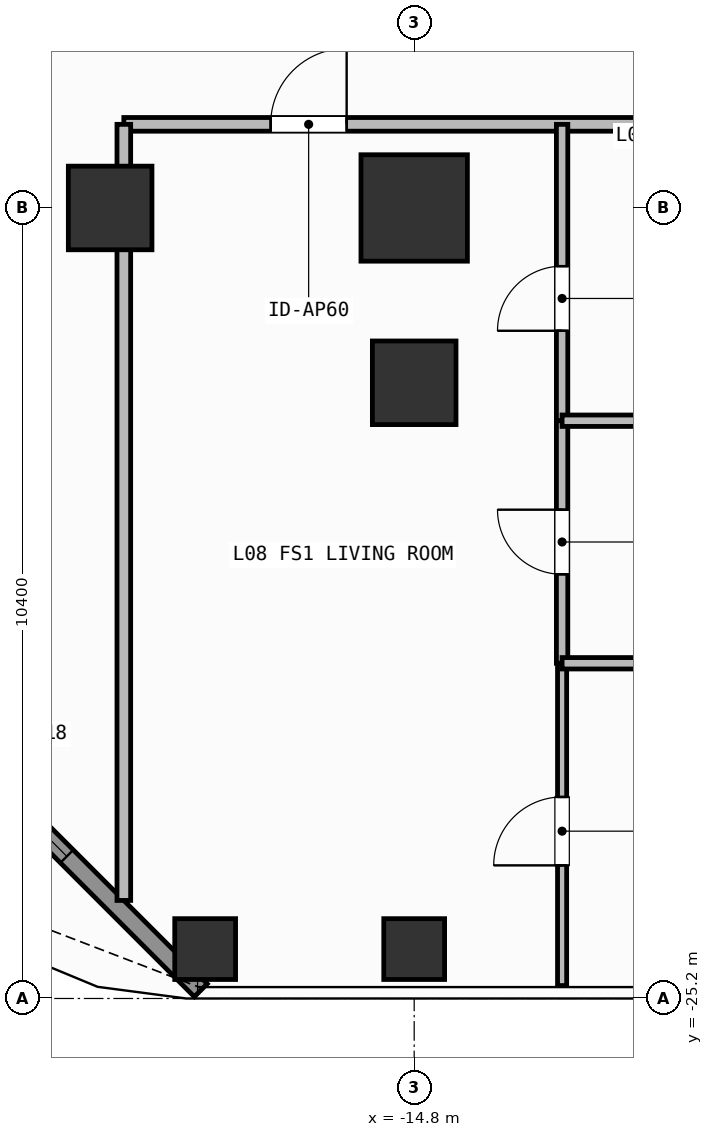
"""IFC4 building model, lengths in metres.
Left out: names, types, materials, properties, quantities, classifications, styles, units other than length and angle.
Written with IfcOpenShell. Run it as: python <this file> out.ifc"""

import sys

from ifc_helpers import new_model, si_unit, direction, frame, frame_2d, origin, origin_2d, place, context, subcontext, project, spatial, rectangle, hollow_rectangle, extrude, element, fill, save


model = new_model("IFC4")
c1 = context("Model", 3, precision=1e-05, world=origin(), true_north=direction((0.0, 1.0)))
c2 = subcontext(c1, "Body", "Model", "MODEL_VIEW")
j1 = project(units=[si_unit("LENGTHUNIT", "METRE"), si_unit("PLANEANGLEUNIT", "RADIAN")], contexts=[c1])
p1 = place(None, origin())
s1 = spatial("IfcSite", under=j1, at=p1, CompositionType="ELEMENT")
p2 = place(p1, origin())
s2 = spatial("IfcBuilding", under=s1, at=p2, CompositionType="ELEMENT")
p3 = place(p2, frame((0.0, 0.0, 30.6)))
s3 = spatial("IfcBuildingStorey", under=s2, at=p3, CompositionType="ELEMENT", Elevation=30.6)
p4 = place(p3, frame((-14.8, -14.8, 0.0), z_axis=(0.0, 0.0, 1.0), x_axis=(1.0, 0.0, 0.0)))
e1 = element("IfcColumn", 1, at=p4, inside=s3, PredefinedType="COLUMN", context=c2, shape_type="SweptSolid", body=[
    extrude(rectangle(XDim=1.4, YDim=1.4, at=origin_2d()), origin(), (0.0, 0.0, 1.0), 3.9),
])
for number, where, z_axis, x_axis in (
    (2, (-18.8, -14.8, 0.0), (0.0, 0.0, 1.0), (1.0, 0.0, 0.0)),
    (3, (-14.8, -17.1, 0.0), (0.0, 0.0, 1.0), (1.0, 0.0, 0.0)),
):
    element("IfcColumn", number, at=place(p3, frame(where, z_axis=z_axis, x_axis=x_axis)), inside=s3, PredefinedType="COLUMN", context=c2, shape_type="SweptSolid", body=[
        extrude(rectangle(XDim=1.1, YDim=1.1, at=origin_2d()), origin(), (0.0, 0.0, 1.0), 3.9),
    ])
for number, where, z_axis, x_axis in (
    (4, (-17.55, -24.55, 0.0), (0.0, 0.0, 1.0), (1.0, 0.0, 0.0)),
    (5, (-14.8, -24.55, 0.0), (0.0, 0.0, 1.0), (1.0, 0.0, 0.0)),
):
    element("IfcColumn", number, at=place(p3, frame(where, z_axis=z_axis, x_axis=x_axis)), inside=s3, PredefinedType="COLUMN", context=c2, shape_type="SweptSolid", body=[
        extrude(hollow_rectangle(XDim=0.8, YDim=0.8, WallThickness=0.036, at=origin_2d()), origin(), (0.0, 0.0, 1.0), 3.9),
    ])
p5 = place(p3, frame((-17.608, -25.092, 0.0), z_axis=(0.0, 0.0, 1.0), x_axis=(-0.707106781187, 0.707106781187, 0.0)))
e6 = element("IfcWall", 6, at=p5, inside=s3, PredefinedType="SOLIDWALL", context=c2, shape_type="SweptSolid", body=[
    extrude(rectangle(XDim=6.484, YDim=0.24, at=frame_2d((3.242, 0.0))), origin(), (0.0, 0.0, 1.0), 3.68),
])
p6 = place(p5, frame((2.492, 0.0, 0.8)))
e7 = element("IfcOpeningElement", 7, at=p6, cuts=e6, PredefinedType="OPENING", context=c2, shape_type="SweptSolid", body=[
    extrude(rectangle(XDim=1.5, YDim=1.85, at=frame_2d((0.75, 0.925))), frame((0.0, 0.13, 0.0), z_axis=(0.0, -1.0, 0.0), x_axis=(1.0, 0.0, 0.0)), (0.0, 0.0, 1.0), 0.26),
])
p7 = place(p3, frame((-18.62, -13.7, 0.0), z_axis=(0.0, 0.0, 1.0), x_axis=(1.0, 0.0, 0.0)))
e8 = element("IfcWall", 8, at=p7, inside=s3, PredefinedType="PARTITIONING", context=c2, shape_type="SweptSolid", body=[
    extrude(rectangle(XDim=9.469, YDim=0.18, at=frame_2d((4.735, 0.0))), origin(), (0.0, 0.0, 1.0), 3.68),
])
p8 = place(p7, frame((1.931, 0.0, 0.0)))
e9 = element("IfcOpeningElement", 9, at=p8, cuts=e8, PredefinedType="OPENING", context=c2, shape_type="SweptSolid", body=[
    extrude(rectangle(XDim=1.0, YDim=2.2, at=frame_2d((0.5, 1.1))), frame((0.0, 0.1, 0.0), z_axis=(0.0, -1.0, 0.0), x_axis=(1.0, 0.0, 0.0)), (0.0, 0.0, 1.0), 0.2),
])
p9 = place(p3, frame((-12.854, -17.599, 0.0), z_axis=(0.0, 0.0, 1.0), x_axis=(0.0, 1.0, 0.0)))
e10 = element("IfcWall", 10, at=p9, inside=s3, PredefinedType="PARTITIONING", context=c2, shape_type="SweptSolid", body=[
    extrude(rectangle(XDim=3.899, YDim=0.15, at=frame_2d((1.95, 0.0))), origin(), (0.0, 0.0, 1.0), 3.68),
])
p10 = place(p9, frame((1.183, 0.0, 0.0)))
e11 = element("IfcOpeningElement", 11, at=p10, cuts=e10, PredefinedType="OPENING", context=c2, shape_type="SweptSolid", body=[
    extrude(rectangle(XDim=0.85, YDim=2.1, at=frame_2d((0.425, 1.05))), frame((0.0, 0.085, 0.0), z_axis=(0.0, -1.0, 0.0), x_axis=(1.0, 0.0, 0.0)), (0.0, 0.0, 1.0), 0.17),
])
p11 = place(p3, frame((-12.854, -20.79, 0.0), z_axis=(0.0, 0.0, 1.0), x_axis=(0.0, 1.0, 0.0)))
e12 = element("IfcWall", 12, at=p11, inside=s3, PredefinedType="PARTITIONING", context=c2, shape_type="SweptSolid", body=[
    extrude(rectangle(XDim=3.191, YDim=0.15, at=frame_2d((1.595, 0.0))), origin(), (0.0, 0.0, 1.0), 3.68),
])
p12 = place(p11, frame((1.17, 0.0, 0.0)))
e13 = element("IfcOpeningElement", 13, at=p12, cuts=e12, PredefinedType="OPENING", context=c2, shape_type="SweptSolid", body=[
    extrude(rectangle(XDim=0.85, YDim=2.1, at=frame_2d((0.425, 1.05))), frame((0.0, 0.085, 0.0), z_axis=(0.0, -1.0, 0.0), x_axis=(1.0, 0.0, 0.0)), (0.0, 0.0, 1.0), 0.17),
])
p13 = place(p3, frame((-12.854, -25.03, 0.0), z_axis=(0.0, 0.0, 1.0), x_axis=(0.0, 1.0, 0.0)))
e14 = element("IfcWall", 14, at=p13, inside=s3, PredefinedType="PARTITIONING", context=c2, shape_type="SweptSolid", body=[
    extrude(rectangle(XDim=4.24, YDim=0.12, at=frame_2d((2.12, 0.0))), origin(), (0.0, 0.0, 1.0), 3.68),
])
p14 = place(p13, frame((1.581, 0.0, 0.0)))
e15 = element("IfcOpeningElement", 15, at=p14, cuts=e14, PredefinedType="OPENING", context=c2, shape_type="SweptSolid", body=[
    extrude(rectangle(XDim=0.9, YDim=2.1, at=frame_2d((0.45, 1.05))), frame((0.0, 0.07, 0.0), z_axis=(0.0, -1.0, 0.0), x_axis=(1.0, 0.0, 0.0)), (0.0, 0.0, 1.0), 0.14),
])
p15 = place(p3, frame((-18.62, -23.91, 0.0), z_axis=(0.0, 0.0, 1.0), x_axis=(0.0, 1.0, 0.0)))
e16 = element("IfcWall", 16, at=p15, inside=s3, PredefinedType="PARTITIONING", context=c2, shape_type="SweptSolid", body=[
    extrude(rectangle(XDim=10.21, YDim=0.18, at=frame_2d((5.105, 0.0))), origin(), (0.0, 0.0, 1.0), 3.082),
])
for number, where, z_axis, x_axis in (
    (17, (-12.854, -17.599, 0.0), (0.0, 0.0, 1.0), (1.0, 0.0, 0.0)),
    (18, (-12.854, -20.79, 0.0), (0.0, 0.0, 1.0), (1.0, 0.0, 0.0)),
):
    element("IfcWall", number, at=place(p3, frame(where, z_axis=z_axis, x_axis=x_axis)), inside=s3, PredefinedType="PARTITIONING", context=c2, shape_type="SweptSolid", body=[
        extrude(rectangle(XDim=3.703, YDim=0.15, at=frame_2d((1.852, 0.0))), origin(), (0.0, 0.0, 1.0), 3.68),
    ])
p16 = place(p6, origin())
e19 = element("IfcWindow", 19, at=p16, inside=s3, PartitioningType="SINGLE_PANEL", PredefinedType="WINDOW", context=c2, shape_type="SweptSolid", body=[
    extrude(rectangle(XDim=1.5, YDim=1.85, at=frame_2d((0.75, 0.925))), frame((0.0, 0.03, 0.0), z_axis=(0.0, -1.0, 0.0), x_axis=(1.0, 0.0, 0.0)), (0.0, 0.0, 1.0), 0.06),
])
fill(e7, e19)
p17 = place(p8, origin())
e20 = element("IfcDoor", 20, at=p17, inside=s3, OperationType="SINGLE_SWING_RIGHT", PredefinedType="DOOR", context=c2, shape_type="SweptSolid", body=[
    extrude(rectangle(XDim=1.0, YDim=2.2, at=frame_2d((0.5, 1.1))), frame((0.0, 0.025, 0.0), z_axis=(0.0, -1.0, 0.0), x_axis=(1.0, 0.0, 0.0)), (0.0, 0.0, 1.0), 0.05),
])
fill(e9, e20)
p18 = place(p10, origin())
e21 = element("IfcDoor", 21, at=p18, inside=s3, OperationType="SINGLE_SWING_LEFT", PredefinedType="DOOR", context=c2, shape_type="SweptSolid", body=[
    extrude(rectangle(XDim=0.85, YDim=2.1, at=frame_2d((0.425, 1.05))), frame((0.0, 0.025, 0.0), z_axis=(0.0, -1.0, 0.0), x_axis=(1.0, 0.0, 0.0)), (0.0, 0.0, 1.0), 0.05),
])
fill(e11, e21)
p19 = place(p12, origin())
e22 = element("IfcDoor", 22, at=p19, inside=s3, OperationType="SINGLE_SWING_RIGHT", PredefinedType="DOOR", context=c2, shape_type="SweptSolid", body=[
    extrude(rectangle(XDim=0.85, YDim=2.1, at=frame_2d((0.425, 1.05))), frame((0.0, 0.025, 0.0), z_axis=(0.0, -1.0, 0.0), x_axis=(1.0, 0.0, 0.0)), (0.0, 0.0, 1.0), 0.05),
])
fill(e13, e22)
p20 = place(p14, origin())
e23 = element("IfcDoor", 23, at=p20, inside=s3, OperationType="SINGLE_SWING_LEFT", PredefinedType="DOOR", context=c2, shape_type="SweptSolid", body=[
    extrude(rectangle(XDim=0.9, YDim=2.1, at=frame_2d((0.45, 1.05))), frame((0.0, 0.025, 0.0), z_axis=(0.0, -1.0, 0.0), x_axis=(1.0, 0.0, 0.0)), (0.0, 0.0, 1.0), 0.05),
])
fill(e15, e23)
save(model, sys.argv[1])
